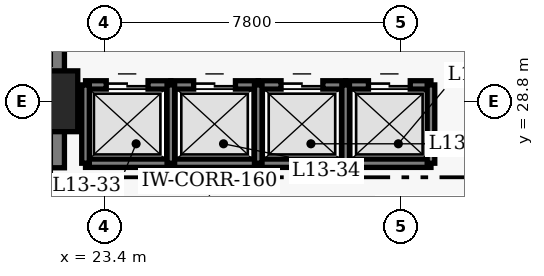
"""IFC4 building model, lengths in metres.
Left out: names, types, materials, properties, quantities, classifications, styles, units other than length and angle.
Written with IfcOpenShell. Run it as: python <this file> out.ifc"""

import sys

from ifc_helpers import new_model, si_unit, direction, frame, frame_2d, origin, origin_2d, place, context, subcontext, project, spatial, rectangle, extrude, element, fill, save


model = new_model("IFC4")
c1 = context("Model", 3, precision=1e-05, world=origin(), true_north=direction((0.0, 1.0)))
c2 = subcontext(c1, "Body", "Model", "MODEL_VIEW")
j1 = project(units=[si_unit("LENGTHUNIT", "METRE"), si_unit("PLANEANGLEUNIT", "RADIAN")], contexts=[c1])
p1 = place(None, origin())
s1 = spatial("IfcSite", under=j1, at=p1, CompositionType="ELEMENT")
p2 = place(p1, origin())
s2 = spatial("IfcBuilding", under=s1, at=p2, CompositionType="ELEMENT")
p3 = place(p2, frame((0.0, 0.0, 56.4)))
s3 = spatial("IfcBuildingStorey", under=s2, at=p3, CompositionType="ELEMENT", Elevation=56.4)
p4 = place(p3, frame((21.9, 27.05, 0.0), z_axis=(0.0, 0.0, 1.0), x_axis=(0.0, 1.0, 0.0)))
e1 = element("IfcWall", 1, at=p4, inside=s3, PredefinedType="SHEAR", context=c2, shape_type="SweptSolid", body=[
    extrude(rectangle(XDim=13.72, YDim=0.9, at=frame_2d((6.86, 0.0))), origin(), (0.0, 0.0, 1.0), 3.8),
])
p5 = place(p3, frame((21.9, 28.8, 0.0), z_axis=(0.0, 0.0, 1.0), x_axis=(1.0, 0.0, 0.0)))
e2 = element("IfcColumn", 2, at=p5, inside=s3, PredefinedType="COLUMN", context=c2, shape_type="SweptSolid", body=[
    extrude(rectangle(XDim=1.6, YDim=1.6, at=origin_2d()), origin(), (0.0, 0.0, 1.0), 3.8),
])
p6 = place(p3, frame((22.905, 29.23, 0.0), z_axis=(0.0, 0.0, 1.0), x_axis=(1.0, 0.0, 0.0)))
e3 = element("IfcWall", 3, at=p6, inside=s3, PredefinedType="SHEAR", context=c2, shape_type="SweptSolid", body=[
    extrude(rectangle(XDim=2.245, YDim=0.22, at=frame_2d((1.123, 0.0))), origin(), (0.0, 0.0, 1.0), 3.8),
])
p7 = place(p6, frame((0.545, 0.0, 0.0)))
e4 = element("IfcOpeningElement", 4, at=p7, cuts=e3, PredefinedType="OPENING", context=c2, shape_type="SweptSolid", body=[
    extrude(rectangle(XDim=1.1, YDim=2.15, at=frame_2d((0.55, 1.075))), frame((0.0, 0.12, 0.0), z_axis=(0.0, -1.0, 0.0), x_axis=(1.0, 0.0, 0.0)), (0.0, 0.0, 1.0), 0.24),
])
p8 = place(p3, frame((22.905, 27.17, 0.0), z_axis=(0.0, 0.0, 1.0), x_axis=(1.0, 0.0, 0.0)))
e5 = element("IfcWall", 5, at=p8, inside=s3, PredefinedType="SHEAR", context=c2, shape_type="SweptSolid", body=[
    extrude(rectangle(XDim=2.245, YDim=0.22, at=frame_2d((1.123, 0.0))), origin(), (0.0, 0.0, 1.0), 3.8),
])
p9 = place(p3, frame((22.905, 27.17, 0.0), z_axis=(0.0, 0.0, 1.0), x_axis=(0.0, 1.0, 0.0)))
e6 = element("IfcWall", 6, at=p9, inside=s3, PredefinedType="SHEAR", context=c2, shape_type="SweptSolid", body=[
    extrude(rectangle(XDim=2.06, YDim=0.2, at=frame_2d((1.03, 0.0))), origin(), (0.0, 0.0, 1.0), 3.8),
])
p10 = place(p3, frame((25.15, 29.23, 0.0), z_axis=(0.0, 0.0, 1.0), x_axis=(1.0, 0.0, 0.0)))
e7 = element("IfcWall", 7, at=p10, inside=s3, PredefinedType="SHEAR", context=c2, shape_type="SweptSolid", body=[
    extrude(rectangle(XDim=2.3, YDim=0.22, at=frame_2d((1.15, 0.0))), origin(), (0.0, 0.0, 1.0), 3.8),
])
p11 = place(p10, frame((0.6, 0.0, 0.0)))
e8 = element("IfcOpeningElement", 8, at=p11, cuts=e7, PredefinedType="OPENING", context=c2, shape_type="SweptSolid", body=[
    extrude(rectangle(XDim=1.1, YDim=2.15, at=frame_2d((0.55, 1.075))), frame((0.0, 0.12, 0.0), z_axis=(0.0, -1.0, 0.0), x_axis=(1.0, 0.0, 0.0)), (0.0, 0.0, 1.0), 0.24),
])
p12 = place(p3, frame((25.15, 27.17, 0.0), z_axis=(0.0, 0.0, 1.0), x_axis=(1.0, 0.0, 0.0)))
e9 = element("IfcWall", 9, at=p12, inside=s3, PredefinedType="SHEAR", context=c2, shape_type="SweptSolid", body=[
    extrude(rectangle(XDim=2.3, YDim=0.22, at=frame_2d((1.15, 0.0))), origin(), (0.0, 0.0, 1.0), 3.8),
])
p13 = place(p3, frame((25.15, 27.17, 0.0), z_axis=(0.0, 0.0, 1.0), x_axis=(0.0, 1.0, 0.0)))
e10 = element("IfcWall", 10, at=p13, inside=s3, PredefinedType="SHEAR", context=c2, shape_type="SweptSolid", body=[
    extrude(rectangle(XDim=2.06, YDim=0.2, at=frame_2d((1.03, 0.0))), origin(), (0.0, 0.0, 1.0), 3.8),
])
p14 = place(p3, frame((27.45, 29.23, 0.0), z_axis=(0.0, 0.0, 1.0), x_axis=(1.0, 0.0, 0.0)))
e11 = element("IfcWall", 11, at=p14, inside=s3, PredefinedType="SHEAR", context=c2, shape_type="SweptSolid", body=[
    extrude(rectangle(XDim=2.3, YDim=0.22, at=frame_2d((1.15, 0.0))), origin(), (0.0, 0.0, 1.0), 3.8),
])
p15 = place(p14, frame((0.6, 0.0, 0.0)))
e12 = element("IfcOpeningElement", 12, at=p15, cuts=e11, PredefinedType="OPENING", context=c2, shape_type="SweptSolid", body=[
    extrude(rectangle(XDim=1.1, YDim=2.15, at=frame_2d((0.55, 1.075))), frame((0.0, 0.12, 0.0), z_axis=(0.0, -1.0, 0.0), x_axis=(1.0, 0.0, 0.0)), (0.0, 0.0, 1.0), 0.24),
])
p16 = place(p3, frame((27.45, 27.17, 0.0), z_axis=(0.0, 0.0, 1.0), x_axis=(1.0, 0.0, 0.0)))
e13 = element("IfcWall", 13, at=p16, inside=s3, PredefinedType="SHEAR", context=c2, shape_type="SweptSolid", body=[
    extrude(rectangle(XDim=2.3, YDim=0.22, at=frame_2d((1.15, 0.0))), origin(), (0.0, 0.0, 1.0), 3.8),
])
p17 = place(p3, frame((27.45, 27.17, 0.0), z_axis=(0.0, 0.0, 1.0), x_axis=(0.0, 1.0, 0.0)))
e14 = element("IfcWall", 14, at=p17, inside=s3, PredefinedType="SHEAR", context=c2, shape_type="SweptSolid", body=[
    extrude(rectangle(XDim=2.06, YDim=0.2, at=frame_2d((1.03, 0.0))), origin(), (0.0, 0.0, 1.0), 3.8),
])
p18 = place(p3, frame((29.75, 29.23, 0.0), z_axis=(0.0, 0.0, 1.0), x_axis=(1.0, 0.0, 0.0)))
e15 = element("IfcWall", 15, at=p18, inside=s3, PredefinedType="SHEAR", context=c2, shape_type="SweptSolid", body=[
    extrude(rectangle(XDim=2.245, YDim=0.22, at=frame_2d((1.123, 0.0))), origin(), (0.0, 0.0, 1.0), 3.8),
])
p19 = place(p18, frame((0.6, 0.0, 0.0)))
e16 = element("IfcOpeningElement", 16, at=p19, cuts=e15, PredefinedType="OPENING", context=c2, shape_type="SweptSolid", body=[
    extrude(rectangle(XDim=1.1, YDim=2.15, at=frame_2d((0.55, 1.075))), frame((0.0, 0.12, 0.0), z_axis=(0.0, -1.0, 0.0), x_axis=(1.0, 0.0, 0.0)), (0.0, 0.0, 1.0), 0.24),
])
p20 = place(p3, frame((29.75, 27.17, 0.0), z_axis=(0.0, 0.0, 1.0), x_axis=(1.0, 0.0, 0.0)))
e17 = element("IfcWall", 17, at=p20, inside=s3, PredefinedType="SHEAR", context=c2, shape_type="SweptSolid", body=[
    extrude(rectangle(XDim=2.245, YDim=0.22, at=frame_2d((1.123, 0.0))), origin(), (0.0, 0.0, 1.0), 3.8),
])
for number, where, z_axis, x_axis in (
    (18, (29.75, 27.17, 0.0), (0.0, 0.0, 1.0), (0.0, 1.0, 0.0)),
    (19, (31.995, 27.17, 0.0), (0.0, 0.0, 1.0), (0.0, 1.0, 0.0)),
):
    element("IfcWall", number, at=place(p3, frame(where, z_axis=z_axis, x_axis=x_axis)), inside=s3, PredefinedType="SHEAR", context=c2, shape_type="SweptSolid", body=[
        extrude(rectangle(XDim=2.06, YDim=0.2, at=frame_2d((1.03, 0.0))), origin(), (0.0, 0.0, 1.0), 3.8),
    ])
p21 = place(p7, origin())
e20 = element("IfcDoor", 20, at=p21, inside=s3, OperationType="DOUBLE_DOOR_SLIDING", PredefinedType="DOOR", context=c2, shape_type="SweptSolid", body=[
    extrude(rectangle(XDim=1.1, YDim=2.15, at=frame_2d((0.55, 1.075))), frame((0.0, 0.025, 0.0), z_axis=(0.0, -1.0, 0.0), x_axis=(1.0, 0.0, 0.0)), (0.0, 0.0, 1.0), 0.05),
])
fill(e4, e20)
p22 = place(p11, origin())
e21 = element("IfcDoor", 21, at=p22, inside=s3, OperationType="DOUBLE_DOOR_SLIDING", PredefinedType="DOOR", context=c2, shape_type="SweptSolid", body=[
    extrude(rectangle(XDim=1.1, YDim=2.15, at=frame_2d((0.55, 1.075))), frame((0.0, 0.025, 0.0), z_axis=(0.0, -1.0, 0.0), x_axis=(1.0, 0.0, 0.0)), (0.0, 0.0, 1.0), 0.05),
])
fill(e8, e21)
p23 = place(p15, origin())
e22 = element("IfcDoor", 22, at=p23, inside=s3, OperationType="DOUBLE_DOOR_SLIDING", PredefinedType="DOOR", context=c2, shape_type="SweptSolid", body=[
    extrude(rectangle(XDim=1.1, YDim=2.15, at=frame_2d((0.55, 1.075))), frame((0.0, 0.025, 0.0), z_axis=(0.0, -1.0, 0.0), x_axis=(1.0, 0.0, 0.0)), (0.0, 0.0, 1.0), 0.05),
])
fill(e12, e22)
p24 = place(p19, origin())
e23 = element("IfcDoor", 23, at=p24, inside=s3, OperationType="DOUBLE_DOOR_SLIDING", PredefinedType="DOOR", context=c2, shape_type="SweptSolid", body=[
    extrude(rectangle(XDim=1.1, YDim=2.15, at=frame_2d((0.55, 1.075))), frame((0.0, 0.025, 0.0), z_axis=(0.0, -1.0, 0.0), x_axis=(1.0, 0.0, 0.0)), (0.0, 0.0, 1.0), 0.05),
])
fill(e16, e23)
save(model, sys.argv[1])
